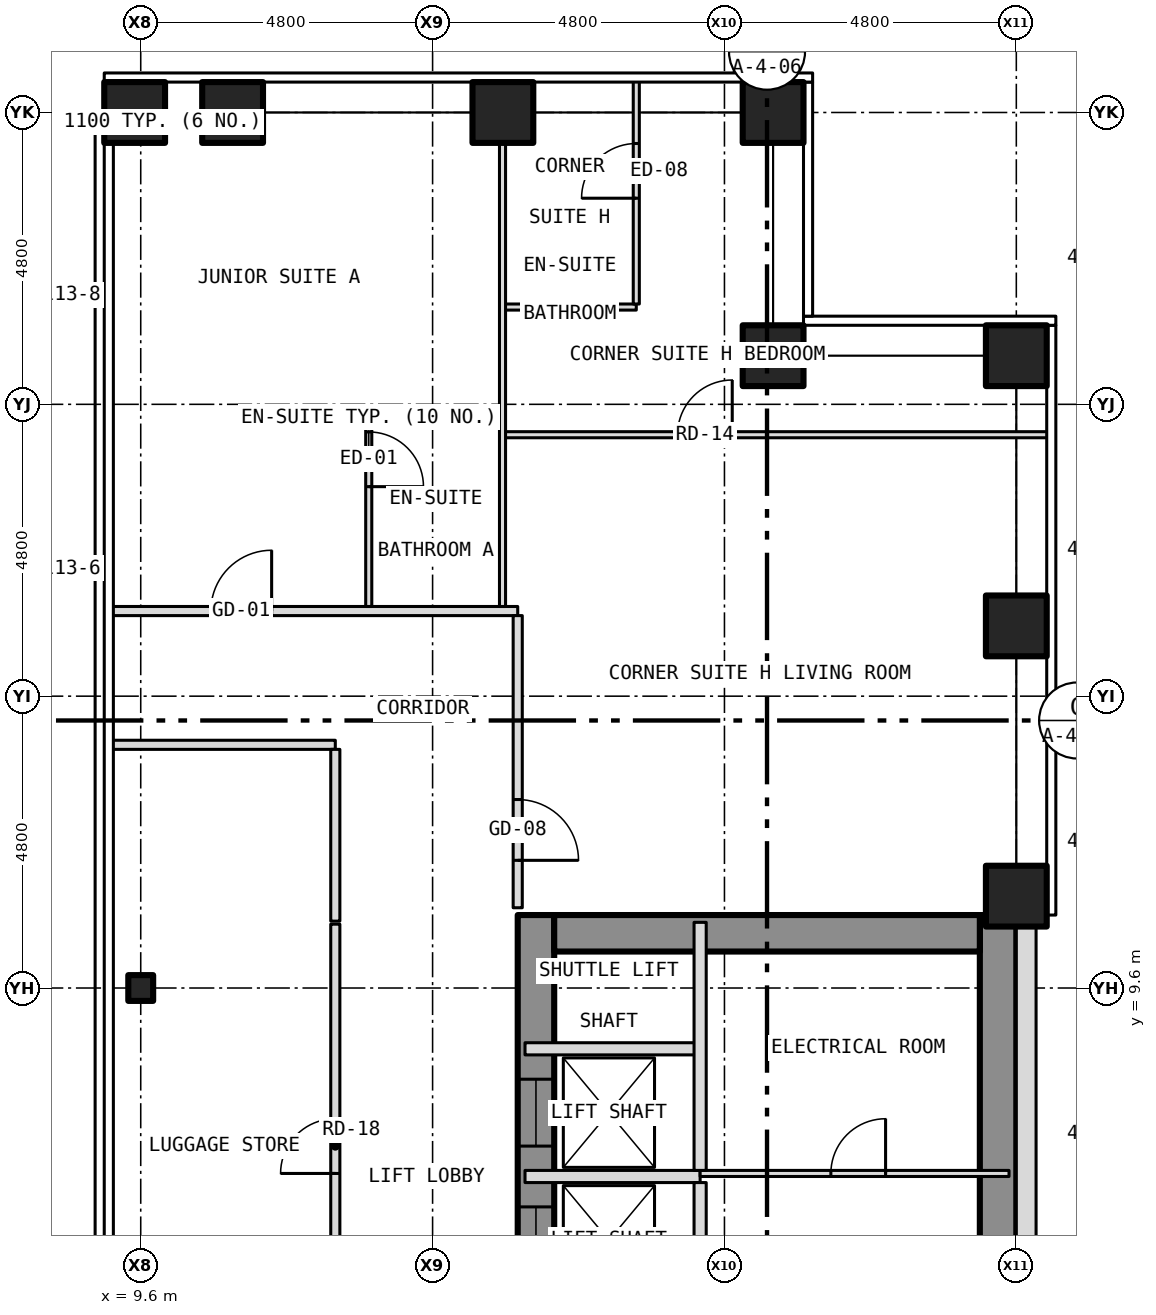
"""IFC4 building model, lengths in metres.
Left out: names, types, materials, properties, quantities, classifications, styles, units other than length and angle.
Written with IfcOpenShell. Run it as: python <this file> out.ifc"""

import sys

from ifc_helpers import new_model, si_unit, direction, frame, frame_2d, origin, origin_2d, place, context, subcontext, project, spatial, rectangle, hollow_rectangle, i_section, extrude, element, fill, save


model = new_model("IFC4")
c1 = context("Model", 3, precision=1e-05, world=origin(), true_north=direction((0.0, 1.0)))
c2 = subcontext(c1, "Body", "Model", "MODEL_VIEW")
j1 = project(units=[si_unit("LENGTHUNIT", "METRE"), si_unit("PLANEANGLEUNIT", "RADIAN")], contexts=[c1])
p1 = place(None, origin())
s1 = spatial("IfcSite", under=j1, at=p1, CompositionType="ELEMENT")
p2 = place(p1, origin())
s2 = spatial("IfcBuilding", under=s1, at=p2, CompositionType="ELEMENT")
p3 = place(p2, frame((0.0, 0.0, 60.0)))
s3 = spatial("IfcBuildingStorey", under=s2, at=p3, CompositionType="ELEMENT", Elevation=60.0)
for number, where, z_axis, x_axis in (
    (1, (11.111, 24.0, -0.15), (0.0, 0.0, 1.0), (1.0, 0.0, 0.0)),
    (2, (15.556, 24.0, -0.15), (0.0, 0.0, 1.0), (1.0, 0.0, 0.0)),
    (3, (20.0, 24.0, -0.15), (0.0, 0.0, 1.0), (1.0, 0.0, 0.0)),
    (4, (24.0, 11.111, -0.15), (0.0, 0.0, 1.0), (1.0, 0.0, 0.0)),
    (5, (24.0, 15.556, -0.15), (0.0, 0.0, 1.0), (1.0, 0.0, 0.0)),
    (6, (24.0, 20.0, -0.15), (0.0, 0.0, 1.0), (1.0, 0.0, 0.0)),
    (7, (20.0, 20.0, -0.15), (0.0, 0.0, 1.0), (1.0, 0.0, 0.0)),
    (8, (9.5, 24.0, -0.15), (0.0, 0.0, 1.0), (1.0, 0.0, 0.0)),
):
    element("IfcColumn", number, at=place(p3, frame(where, z_axis=z_axis, x_axis=x_axis)), inside=s3, PredefinedType="COLUMN", context=c2, shape_type="SweptSolid", body=[
        extrude(hollow_rectangle(XDim=1.0, YDim=1.0, WallThickness=0.06, at=origin_2d()), origin(), (0.0, 0.0, 1.0), 3.5),
    ])
p4 = place(p3, frame((9.6, 9.6, -0.15), z_axis=(0.0, 0.0, 1.0), x_axis=(1.0, 0.0, 0.0)))
e9 = element("IfcColumn", 9, at=p4, inside=s3, PredefinedType="COLUMN", context=c2, shape_type="SweptSolid", body=[
    extrude(i_section(OverallWidth=0.409, OverallDepth=0.424, WebThickness=0.033, FlangeThickness=0.052, at=origin_2d()), origin(), (0.0, 0.0, 1.0), 3.5),
])
p5 = place(p3, frame((16.1, -10.8, 0.0), z_axis=(0.0, 0.0, 1.0), x_axis=(0.0, 1.0, 0.0)))
e10 = element("IfcWall", 10, at=p5, inside=s3, PredefinedType="SHEAR", context=c2, shape_type="SweptSolid", body=[
    extrude(rectangle(XDim=21.6, YDim=0.6, at=frame_2d((10.8, 0.0))), origin(), (0.0, 0.0, 1.0), 3.25),
])
p6 = place(p5, frame((9.4, 0.0, 0.0)))
e11 = element("IfcOpeningElement", 11, at=p6, cuts=e10, PredefinedType="OPENING", context=c2, shape_type="SweptSolid", body=[
    extrude(rectangle(XDim=1.1, YDim=2.1, at=frame_2d((0.55, 1.05))), frame((0.0, 0.312, 0.0), z_axis=(0.0, -1.0, 0.0), x_axis=(1.0, 0.0, 0.0)), (0.0, 0.0, 1.0), 0.624),
])
p7 = place(p5, frame((11.5, 0.0, 0.0)))
e12 = element("IfcOpeningElement", 12, at=p7, cuts=e10, PredefinedType="OPENING", context=c2, shape_type="SweptSolid", body=[
    extrude(rectangle(XDim=1.1, YDim=2.1, at=frame_2d((0.55, 1.05))), frame((0.0, 0.312, 0.0), z_axis=(0.0, -1.0, 0.0), x_axis=(1.0, 0.0, 0.0)), (0.0, 0.0, 1.0), 0.624),
])
p8 = place(p5, frame((13.6, 0.0, 0.0)))
e13 = element("IfcOpeningElement", 13, at=p8, cuts=e10, PredefinedType="OPENING", context=c2, shape_type="SweptSolid", body=[
    extrude(rectangle(XDim=1.1, YDim=2.1, at=frame_2d((0.55, 1.05))), frame((0.0, 0.312, 0.0), z_axis=(0.0, -1.0, 0.0), x_axis=(1.0, 0.0, 0.0)), (0.0, 0.0, 1.0), 0.624),
])
p9 = place(p5, frame((15.7, 0.0, 0.0)))
e14 = element("IfcOpeningElement", 14, at=p9, cuts=e10, PredefinedType="OPENING", context=c2, shape_type="SweptSolid", body=[
    extrude(rectangle(XDim=1.1, YDim=2.1, at=frame_2d((0.55, 1.05))), frame((0.0, 0.312, 0.0), z_axis=(0.0, -1.0, 0.0), x_axis=(1.0, 0.0, 0.0)), (0.0, 0.0, 1.0), 0.624),
])
p10 = place(p5, frame((17.8, 0.0, 0.0)))
e15 = element("IfcOpeningElement", 15, at=p10, cuts=e10, PredefinedType="OPENING", context=c2, shape_type="SweptSolid", body=[
    extrude(rectangle(XDim=1.1, YDim=2.1, at=frame_2d((0.55, 1.05))), frame((0.0, 0.312, 0.0), z_axis=(0.0, -1.0, 0.0), x_axis=(1.0, 0.0, 0.0)), (0.0, 0.0, 1.0), 0.624),
])
p11 = place(p5, frame((5.642, 0.0, 0.0)))
e16 = element("IfcOpeningElement", 16, at=p11, cuts=e10, PredefinedType="OPENING", context=c2, shape_type="SweptSolid", body=[
    extrude(rectangle(XDim=1.1, YDim=2.1, at=frame_2d((0.55, 1.05))), frame((0.0, 0.312, 0.0), z_axis=(0.0, -1.0, 0.0), x_axis=(1.0, 0.0, 0.0)), (0.0, 0.0, 1.0), 0.624),
])
p12 = place(p5, frame((7.5, 0.0, 0.0)))
e17 = element("IfcOpeningElement", 17, at=p12, cuts=e10, PredefinedType="OPENING", context=c2, shape_type="SweptSolid", body=[
    extrude(rectangle(XDim=1.1, YDim=2.1, at=frame_2d((0.55, 1.05))), frame((0.0, 0.312, 0.0), z_axis=(0.0, -1.0, 0.0), x_axis=(1.0, 0.0, 0.0)), (0.0, 0.0, 1.0), 0.624),
])
p13 = place(p3, frame((23.7, -10.8, 0.0), z_axis=(0.0, 0.0, 1.0), x_axis=(0.0, 1.0, 0.0)))
e18 = element("IfcWall", 18, at=p13, inside=s3, PredefinedType="SHEAR", context=c2, shape_type="SweptSolid", body=[
    extrude(rectangle(XDim=21.6, YDim=0.6, at=frame_2d((10.8, 0.0))), origin(), (0.0, 0.0, 1.0), 3.25),
])
p14 = place(p3, frame((16.4, 10.5, 0.0), z_axis=(0.0, 0.0, 1.0), x_axis=(1.0, 0.0, 0.0)))
e19 = element("IfcWall", 19, at=p14, inside=s3, PredefinedType="SHEAR", context=c2, shape_type="SweptSolid", body=[
    extrude(rectangle(XDim=7.0, YDim=0.6, at=frame_2d((3.5, 0.0))), origin(), (0.0, 0.0, 1.0), 3.25),
])
p15 = place(p3, frame((24.163, -10.8, 0.0), z_axis=(0.0, 0.0, 1.0), x_axis=(0.0, 1.0, 0.0)))
e20 = element("IfcWall", 20, at=p15, inside=s3, PredefinedType="SOLIDWALL", context=c2, shape_type="SweptSolid", body=[
    extrude(rectangle(XDim=21.6, YDim=0.325, at=frame_2d((10.8, 0.0))), origin(), (0.0, 0.0, 1.0), 3.5),
])
p16 = place(p15, frame((2.95, 0.0, 1.0)))
e21 = element("IfcOpeningElement", 21, at=p16, cuts=e20, PredefinedType="OPENING", context=c2, shape_type="SweptSolid", body=[
    extrude(rectangle(XDim=0.6, YDim=1.5, at=frame_2d((0.3, 0.75))), frame((0.0, 0.175, 0.0), z_axis=(0.0, -1.0, 0.0), x_axis=(1.0, 0.0, 0.0)), (0.0, 0.0, 1.0), 0.349),
])
p17 = place(p3, frame((15.92, 6.5, 0.0), z_axis=(0.0, 0.0, 1.0), x_axis=(1.0, 0.0, 0.0)))
e22 = element("IfcWall", 22, at=p17, inside=s3, PredefinedType="PARTITIONING", context=c2, shape_type="SweptSolid", body=[
    extrude(rectangle(XDim=2.88, YDim=0.2, at=frame_2d((1.44, 0.0))), origin(), (0.0, 0.0, 1.0), 3.25),
])
p18 = place(p3, frame((18.8, 6.55, 0.0), z_axis=(0.0, 0.0, 1.0), x_axis=(1.0, 0.0, 0.0)))
e23 = element("IfcWall", 23, at=p18, inside=s3, PredefinedType="PARTITIONING", context=c2, shape_type="SweptSolid", body=[
    extrude(rectangle(XDim=5.08, YDim=0.1, at=frame_2d((2.54, 0.0))), origin(), (0.0, 0.0, 1.0), 3.25),
])
p19 = place(p18, frame((2.15, 0.0, 0.0)))
e24 = element("IfcOpeningElement", 24, at=p19, cuts=e23, PredefinedType="OPENING", context=c2, shape_type="SweptSolid", body=[
    extrude(rectangle(XDim=0.9, YDim=2.1, at=frame_2d((0.45, 1.05))), frame((0.0, 0.062, 0.0), z_axis=(0.0, -1.0, 0.0), x_axis=(1.0, 0.0, 0.0)), (0.0, 0.0, 1.0), 0.124),
])
p20 = place(p3, frame((15.92, 8.6, 0.0), z_axis=(0.0, 0.0, 1.0), x_axis=(1.0, 0.0, 0.0)))
e25 = element("IfcWall", 25, at=p20, inside=s3, PredefinedType="PARTITIONING", context=c2, shape_type="SweptSolid", body=[
    extrude(rectangle(XDim=2.88, YDim=0.2, at=frame_2d((1.44, 0.0))), origin(), (0.0, 0.0, 1.0), 3.25),
])
p21 = place(p3, frame((9.12, 13.6, 0.0), z_axis=(0.0, 0.0, 1.0), x_axis=(1.0, 0.0, 0.0)))
e26 = element("IfcWall", 26, at=p21, inside=s3, PredefinedType="PARTITIONING", context=c2, shape_type="SweptSolid", body=[
    extrude(rectangle(XDim=3.68, YDim=0.15, at=frame_2d((1.84, 0.0))), origin(), (0.0, 0.0, 1.0), 3.35),
])
p22 = place(p3, frame((9.12, 15.8, 0.0), z_axis=(0.0, 0.0, 1.0), x_axis=(1.0, 0.0, 0.0)))
e27 = element("IfcWall", 27, at=p22, inside=s3, PredefinedType="PARTITIONING", context=c2, shape_type="SweptSolid", body=[
    extrude(rectangle(XDim=6.68, YDim=0.15, at=frame_2d((3.34, 0.0))), origin(), (0.0, 0.0, 1.0), 3.35),
])
p23 = place(p22, frame((1.633, 0.0, 0.0)))
e28 = element("IfcOpeningElement", 28, at=p23, cuts=e27, PredefinedType="OPENING", context=c2, shape_type="SweptSolid", body=[
    extrude(rectangle(XDim=1.0, YDim=2.1, at=frame_2d((0.5, 1.05))), frame((0.0, 0.087, 0.0), z_axis=(0.0, -1.0, 0.0), x_axis=(1.0, 0.0, 0.0)), (0.0, 0.0, 1.0), 0.174),
])
p24 = place(p3, frame((15.55, 18.7, 0.0), z_axis=(0.0, 0.0, 1.0), x_axis=(1.0, 0.0, 0.0)))
e29 = element("IfcWall", 29, at=p24, inside=s3, PredefinedType="PARTITIONING", context=c2, shape_type="SweptSolid", body=[
    extrude(rectangle(XDim=8.98, YDim=0.1, at=frame_2d((4.49, 0.0))), origin(), (0.0, 0.0, 1.0), 3.35),
])
p25 = place(p24, frame((2.878, 0.0, 0.0)))
e30 = element("IfcOpeningElement", 30, at=p25, cuts=e29, PredefinedType="OPENING", context=c2, shape_type="SweptSolid", body=[
    extrude(rectangle(XDim=0.9, YDim=2.1, at=frame_2d((0.45, 1.05))), frame((0.0, 0.062, 0.0), z_axis=(0.0, -1.0, 0.0), x_axis=(1.0, 0.0, 0.0)), (0.0, 0.0, 1.0), 0.124),
])
for number, where, z_axis, x_axis in (
    (31, (13.35, 19.0, 0.0), (0.0, 0.0, 1.0), (1.0, 0.0, 0.0)),
    (32, (15.55, 20.8, 0.0), (0.0, 0.0, 1.0), (1.0, 0.0, 0.0)),
):
    element("IfcWall", number, at=place(p3, frame(where, z_axis=z_axis, x_axis=x_axis)), inside=s3, PredefinedType="PARTITIONING", context=c2, shape_type="SweptSolid", body=[
        extrude(rectangle(XDim=2.2, YDim=0.1, at=frame_2d((1.1, 0.0))), origin(), (0.0, 0.0, 1.0), 3.35),
    ])
p26 = place(p3, frame((12.8, 3.375, 0.0), z_axis=(0.0, 0.0, 1.0), x_axis=(0.0, 1.0, 0.0)))
e33 = element("IfcWall", 33, at=p26, inside=s3, PredefinedType="PARTITIONING", context=c2, shape_type="SweptSolid", body=[
    extrude(rectangle(XDim=7.275, YDim=0.15, at=frame_2d((3.637, 0.0))), origin(), (0.0, 0.0, 1.0), 3.35),
])
p27 = place(p26, frame((3.175, 0.0, 0.0)))
e34 = element("IfcOpeningElement", 34, at=p27, cuts=e33, PredefinedType="OPENING", context=c2, shape_type="SweptSolid", body=[
    extrude(rectangle(XDim=0.9, YDim=2.1, at=frame_2d((0.45, 1.05))), frame((0.0, 0.087, 0.0), z_axis=(0.0, -1.0, 0.0), x_axis=(1.0, 0.0, 0.0)), (0.0, 0.0, 1.0), 0.174),
])
p28 = place(p3, frame((12.8, 10.7, 0.0), z_axis=(0.0, 0.0, 1.0), x_axis=(0.0, 1.0, 0.0)))
e35 = element("IfcWall", 35, at=p28, inside=s3, PredefinedType="PARTITIONING", context=c2, shape_type="SweptSolid", body=[
    extrude(rectangle(XDim=2.825, YDim=0.15, at=frame_2d((1.413, 0.0))), origin(), (0.0, 0.0, 1.0), 3.35),
])
p29 = place(p3, frame((13.35, 15.875, 0.0), z_axis=(0.0, 0.0, 1.0), x_axis=(0.0, 1.0, 0.0)))
e36 = element("IfcWall", 36, at=p29, inside=s3, PredefinedType="PARTITIONING", context=c2, shape_type="SweptSolid", body=[
    extrude(rectangle(XDim=3.075, YDim=0.1, at=frame_2d((1.538, 0.0))), origin(), (0.0, 0.0, 1.0), 3.35),
])
p30 = place(p29, frame((1.971, 0.0, 0.0)))
e37 = element("IfcOpeningElement", 37, at=p30, cuts=e36, PredefinedType="OPENING", context=c2, shape_type="SweptSolid", body=[
    extrude(rectangle(XDim=0.9, YDim=2.1, at=frame_2d((0.45, 1.05))), frame((0.0, 0.062, 0.0), z_axis=(0.0, -1.0, 0.0), x_axis=(1.0, 0.0, 0.0)), (0.0, 0.0, 1.0), 0.124),
])
p31 = place(p3, frame((15.55, 15.875, 0.0), z_axis=(0.0, 0.0, 1.0), x_axis=(0.0, 1.0, 0.0)))
e38 = element("IfcWall", 38, at=p31, inside=s3, PredefinedType="PARTITIONING", context=c2, shape_type="SweptSolid", body=[
    extrude(rectangle(XDim=8.005, YDim=0.1, at=frame_2d((4.002, 0.0))), origin(), (0.0, 0.0, 1.0), 3.35),
])
p32 = place(p3, frame((15.8, 10.92, 0.0), z_axis=(0.0, 0.0, 1.0), x_axis=(0.0, 1.0, 0.0)))
e39 = element("IfcWall", 39, at=p32, inside=s3, PredefinedType="PARTITIONING", context=c2, shape_type="SweptSolid", body=[
    extrude(rectangle(XDim=4.805, YDim=0.15, at=frame_2d((2.403, 0.0))), origin(), (0.0, 0.0, 1.0), 3.35),
])
p33 = place(p32, frame((0.78, 0.0, 0.0)))
e40 = element("IfcOpeningElement", 40, at=p33, cuts=e39, PredefinedType="OPENING", context=c2, shape_type="SweptSolid", body=[
    extrude(rectangle(XDim=1.0, YDim=2.1, at=frame_2d((0.5, 1.05))), frame((0.0, 0.087, 0.0), z_axis=(0.0, -1.0, 0.0), x_axis=(1.0, 0.0, 0.0)), (0.0, 0.0, 1.0), 0.174),
])
p34 = place(p3, frame((17.75, 20.85, 0.0), z_axis=(0.0, 0.0, 1.0), x_axis=(0.0, 1.0, 0.0)))
e41 = element("IfcWall", 41, at=p34, inside=s3, PredefinedType="PARTITIONING", context=c2, shape_type="SweptSolid", body=[
    extrude(rectangle(XDim=3.68, YDim=0.1, at=frame_2d((1.84, 0.0))), origin(), (0.0, 0.0, 1.0), 3.35),
])
p35 = place(p34, frame((1.74, 0.0, 0.0)))
e42 = element("IfcOpeningElement", 42, at=p35, cuts=e41, PredefinedType="OPENING", context=c2, shape_type="SweptSolid", body=[
    extrude(rectangle(XDim=0.9, YDim=2.1, at=frame_2d((0.45, 1.05))), frame((0.0, 0.062, 0.0), z_axis=(0.0, -1.0, 0.0), x_axis=(1.0, 0.0, 0.0)), (0.0, 0.0, 1.0), 0.124),
])
p36 = place(p3, frame((18.8, 2.4, 0.0), z_axis=(0.0, 0.0, 1.0), x_axis=(0.0, 1.0, 0.0)))
e43 = element("IfcWall", 43, at=p36, inside=s3, PredefinedType="PARTITIONING", context=c2, shape_type="SweptSolid", body=[
    extrude(rectangle(XDim=4.0, YDim=0.2, at=frame_2d((2.0, 0.0))), origin(), (0.0, 0.0, 1.0), 3.25),
])
p37 = place(p3, frame((18.8, 6.6, 0.0), z_axis=(0.0, 0.0, 1.0), x_axis=(0.0, 1.0, 0.0)))
e44 = element("IfcWall", 44, at=p37, inside=s3, PredefinedType="PARTITIONING", context=c2, shape_type="SweptSolid", body=[
    extrude(rectangle(XDim=4.08, YDim=0.2, at=frame_2d((2.04, 0.0))), origin(), (0.0, 0.0, 1.0), 3.25),
])
p38 = place(p9, origin())
e45 = element("IfcDoor", 45, at=p38, inside=s3, OperationType="SLIDING_TO_LEFT", PredefinedType="DOOR", context=c2, shape_type="SweptSolid", body=[
    extrude(rectangle(XDim=1.1, YDim=2.1, at=frame_2d((0.55, 1.05))), frame((0.0, 0.025, 0.0), z_axis=(0.0, -1.0, 0.0), x_axis=(1.0, 0.0, 0.0)), (0.0, 0.0, 1.0), 0.05),
])
fill(e14, e45)
p39 = place(p10, origin())
e46 = element("IfcDoor", 46, at=p39, inside=s3, OperationType="SLIDING_TO_LEFT", PredefinedType="DOOR", context=c2, shape_type="SweptSolid", body=[
    extrude(rectangle(XDim=1.1, YDim=2.1, at=frame_2d((0.55, 1.05))), frame((0.0, 0.025, 0.0), z_axis=(0.0, -1.0, 0.0), x_axis=(1.0, 0.0, 0.0)), (0.0, 0.0, 1.0), 0.05),
])
fill(e15, e46)
p40 = place(p19, origin())
e47 = element("IfcDoor", 47, at=p40, inside=s3, OperationType="SINGLE_SWING_RIGHT", PredefinedType="DOOR", context=c2, shape_type="SweptSolid", body=[
    extrude(rectangle(XDim=0.9, YDim=2.1, at=frame_2d((0.45, 1.05))), frame((0.0, 0.025, 0.0), z_axis=(0.0, -1.0, 0.0), x_axis=(1.0, 0.0, 0.0)), (0.0, 0.0, 1.0), 0.05),
])
fill(e24, e47)
p41 = place(p23, origin())
e48 = element("IfcDoor", 48, at=p41, inside=s3, OperationType="SINGLE_SWING_RIGHT", PredefinedType="DOOR", context=c2, shape_type="SweptSolid", body=[
    extrude(rectangle(XDim=1.0, YDim=2.1, at=frame_2d((0.5, 1.05))), frame((0.0, 0.025, 0.0), z_axis=(0.0, -1.0, 0.0), x_axis=(1.0, 0.0, 0.0)), (0.0, 0.0, 1.0), 0.05),
])
fill(e28, e48)
p42 = place(p30, origin())
e49 = element("IfcDoor", 49, at=p42, inside=s3, OperationType="SINGLE_SWING_LEFT", PredefinedType="DOOR", context=c2, shape_type="SweptSolid", body=[
    extrude(rectangle(XDim=0.9, YDim=2.1, at=frame_2d((0.45, 1.05))), frame((0.0, 0.025, 0.0), z_axis=(0.0, -1.0, 0.0), x_axis=(1.0, 0.0, 0.0)), (0.0, 0.0, 1.0), 0.05),
])
fill(e37, e49)
p43 = place(p33, origin())
e50 = element("IfcDoor", 50, at=p43, inside=s3, OperationType="SINGLE_SWING_LEFT", PredefinedType="DOOR", context=c2, shape_type="SweptSolid", body=[
    extrude(rectangle(XDim=1.0, YDim=2.1, at=frame_2d((0.5, 1.05))), frame((0.0, 0.025, 0.0), z_axis=(0.0, -1.0, 0.0), x_axis=(1.0, 0.0, 0.0)), (0.0, 0.0, 1.0), 0.05),
])
fill(e40, e50)
p44 = place(p25, origin())
e51 = element("IfcDoor", 51, at=p44, inside=s3, OperationType="SINGLE_SWING_RIGHT", PredefinedType="DOOR", context=c2, shape_type="SweptSolid", body=[
    extrude(rectangle(XDim=0.9, YDim=2.1, at=frame_2d((0.45, 1.05))), frame((0.0, 0.025, 0.0), z_axis=(0.0, -1.0, 0.0), x_axis=(1.0, 0.0, 0.0)), (0.0, 0.0, 1.0), 0.05),
])
fill(e30, e51)
p45 = place(p35, origin())
e52 = element("IfcDoor", 52, at=p45, inside=s3, OperationType="SINGLE_SWING_LEFT", PredefinedType="DOOR", context=c2, shape_type="SweptSolid", body=[
    extrude(rectangle(XDim=0.9, YDim=2.1, at=frame_2d((0.45, 1.05))), frame((0.0, 0.025, 0.0), z_axis=(0.0, -1.0, 0.0), x_axis=(1.0, 0.0, 0.0)), (0.0, 0.0, 1.0), 0.05),
])
fill(e42, e52)
p46 = place(p27, origin())
e53 = element("IfcDoor", 53, at=p46, inside=s3, OperationType="SINGLE_SWING_LEFT", PredefinedType="DOOR", context=c2, shape_type="SweptSolid", body=[
    extrude(rectangle(XDim=0.9, YDim=2.1, at=frame_2d((0.45, 1.05))), frame((0.0, 0.025, 0.0), z_axis=(0.0, -1.0, 0.0), x_axis=(1.0, 0.0, 0.0)), (0.0, 0.0, 1.0), 0.05),
])
fill(e34, e53)
save(model, sys.argv[1])
